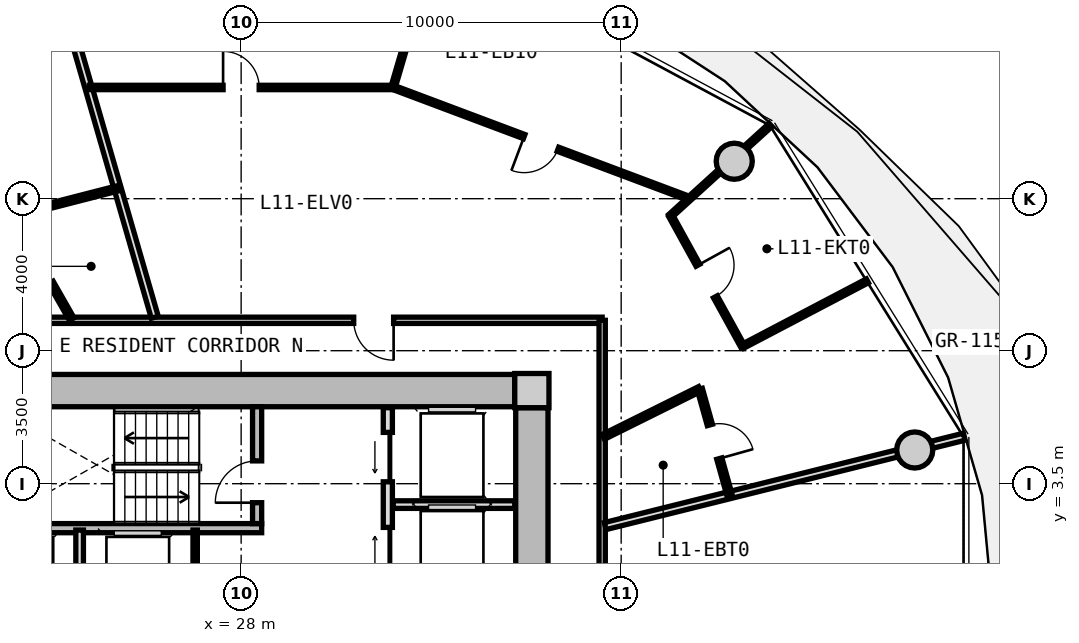
"""IFC4 building model, lengths in metres.
Left out: names, types, materials, properties, quantities, classifications, styles, units other than length and angle.
Written with IfcOpenShell. Run it as: python <this file> out.ifc"""

import sys

from ifc_helpers import new_model, si_unit, direction, frame, frame_2d, origin, origin_2d, place, context, subcontext, project, spatial, rectangle, circle, extrude, source, transform, mapped, element, fill, save


model = new_model("IFC4")
c1 = context("Model", 3, precision=1e-05, world=origin(), true_north=direction((0.0, 1.0)))
c2 = subcontext(c1, "Body", "Model", "MODEL_VIEW")
j1 = project(units=[si_unit("LENGTHUNIT", "METRE"), si_unit("PLANEANGLEUNIT", "RADIAN")], contexts=[c1])
p1 = place(None, origin())
s1 = spatial("IfcSite", under=j1, at=p1, CompositionType="ELEMENT")
p2 = place(p1, origin())
s2 = spatial("IfcBuilding", under=s1, at=p2, CompositionType="ELEMENT")
p3 = place(p2, frame((0.0, 0.0, 39.9)))
s3 = spatial("IfcBuildingStorey", under=s2, at=p3, CompositionType="ELEMENT", Elevation=39.9)
m1 = source(origin(), c2, "Body", "SweptSolid", [
    extrude(rectangle(XDim=0.9, YDim=0.9, at=origin_2d()), origin(), (0.0, 0.0, 1.0), 3.05),
])
p4 = place(p3, frame((35.65, 5.95, 0.0), z_axis=(0.0, 0.0, 1.0), x_axis=(1.0, 0.0, 0.0)))
e1 = element("IfcColumn", 1, at=p4, inside=s3, PredefinedType="COLUMN", context=c2, shape_type="MappedRepresentation", body=[
    mapped(m1, transform((0.0, 0.0, 0.0), x_axis=(1.0, 0.0, 0.0), y_axis=(0.0, 1.0, 0.0), z_axis=(0.0, 0.0, 1.0), scale=1.0)),
])
m2 = source(origin(), c2, "Body", "SweptSolid", [
    extrude(rectangle(XDim=14.4, YDim=0.85, at=frame_2d((7.2, 0.0))), origin(), (0.0, 0.0, 1.0), 2.79),
])
p5 = place(p3, frame((20.8, 5.95, 0.0), z_axis=(0.0, 0.0, 1.0), x_axis=(1.0, 0.0, 0.0)))
e2 = element("IfcWall", 2, at=p5, inside=s3, PredefinedType="SHEAR", context=c2, shape_type="MappedRepresentation", body=[
    mapped(m2, transform((0.0, 0.0, 0.0), x_axis=(1.0, 0.0, 0.0), y_axis=(0.0, 1.0, 0.0), z_axis=(0.0, 0.0, 1.0), scale=1.0)),
])
m3 = source(origin(), c2, "Body", "SweptSolid", [
    extrude(rectangle(XDim=11.0, YDim=0.85, at=frame_2d((5.5, 0.0))), origin(), (0.0, 0.0, 1.0), 2.79),
])
p6 = place(p3, frame((35.65, 5.5, 0.0), z_axis=(0.0, 0.0, 1.0), x_axis=(0.0, -1.0, 0.0)))
e3 = element("IfcWall", 3, at=p6, inside=s3, PredefinedType="SHEAR", context=c2, shape_type="MappedRepresentation", body=[
    mapped(m3, transform((0.0, 0.0, 0.0), x_axis=(1.0, 0.0, 0.0), y_axis=(0.0, 1.0, 0.0), z_axis=(0.0, 0.0, 1.0), scale=1.0)),
])
p7 = place(p6, frame((5.65, 0.0, 0.0)))
e4 = element("IfcOpeningElement", 4, at=p7, cuts=e3, PredefinedType="OPENING", context=c2, shape_type="SweptSolid", body=[
    extrude(rectangle(XDim=1.2, YDim=2.15, at=frame_2d((0.6, 1.075))), frame((0.0, 0.435, 0.0), z_axis=(0.0, -1.0, 0.0), x_axis=(1.0, 0.0, 0.0)), (0.0, 0.0, 1.0), 0.87),
])
p8 = place(p6, frame((9.3, 0.0, 0.0)))
e5 = element("IfcOpeningElement", 5, at=p8, cuts=e3, PredefinedType="OPENING", context=c2, shape_type="SweptSolid", body=[
    extrude(rectangle(XDim=1.0, YDim=2.1, at=frame_2d((0.5, 1.05))), frame((0.0, 0.435, 0.0), z_axis=(0.0, -1.0, 0.0), x_axis=(1.0, 0.0, 0.0)), (0.0, 0.0, 1.0), 0.87),
])
m4 = source(origin(), c2, "Body", "SweptSolid", [
    extrude(circle(Radius=0.475, at=origin_2d()), origin(), (0.0, 0.0, 1.0), 3.05),
])
for number, where, z_axis, x_axis in (
    (6, (45.725, 4.387, 0.0), (0.0, 0.0, 1.0), (1.0, 0.0, 0.0)),
    (7, (40.975, 11.985, 0.0), (0.0, 0.0, 1.0), (1.0, 0.0, 0.0)),
):
    element("IfcColumn", number, at=place(p3, frame(where, z_axis=z_axis, x_axis=x_axis)), inside=s3, PredefinedType="COLUMN", context=c2, shape_type="MappedRepresentation", body=[
        mapped(m4, transform((0.0, 0.0, 0.0), x_axis=(1.0, 0.0, 0.0), y_axis=(0.0, 1.0, 0.0), z_axis=(0.0, 0.0, 1.0), scale=1.0)),
    ])
m5 = source(origin(), c2, "Body", "SweptSolid", [
    extrude(rectangle(XDim=7.765, YDim=0.24, at=frame_2d((3.883, 0.0))), origin(), (0.0, 0.0, 1.0), 2.79),
])
p9 = place(p3, frame((20.775, 2.33, 0.0), z_axis=(0.0, 0.0, 1.0), x_axis=(1.0, 0.0, 0.0)))
e8 = element("IfcWall", 8, at=p9, inside=s3, PredefinedType="PARTITIONING", context=c2, shape_type="MappedRepresentation", body=[
    mapped(m5, transform((0.0, 0.0, 0.0), x_axis=(1.0, 0.0, 0.0), y_axis=(0.0, 1.0, 0.0), z_axis=(0.0, 0.0, 1.0), scale=1.0)),
])
m6 = source(origin(), c2, "Body", "SweptSolid", [
    extrude(rectangle(XDim=3.075, YDim=0.24, at=frame_2d((1.538, 0.0))), origin(), (0.0, 0.0, 1.0), 2.79),
])
p10 = place(p3, frame((28.42, 2.45, 0.0), z_axis=(0.0, 0.0, 1.0), x_axis=(0.0, 1.0, 0.0)))
e9 = element("IfcWall", 9, at=p10, inside=s3, PredefinedType="PARTITIONING", context=c2, shape_type="MappedRepresentation", body=[
    mapped(m6, transform((0.0, 0.0, 0.0), x_axis=(1.0, 0.0, 0.0), y_axis=(0.0, 1.0, 0.0), z_axis=(0.0, 0.0, 1.0), scale=1.0)),
])
p11 = place(p10, frame((0.55, 0.0, 0.0)))
e10 = element("IfcOpeningElement", 10, at=p11, cuts=e9, PredefinedType="OPENING", context=c2, shape_type="SweptSolid", body=[
    extrude(rectangle(XDim=1.1, YDim=2.15, at=frame_2d((0.55, 1.075))), frame((0.0, 0.13, 0.0), z_axis=(0.0, -1.0, 0.0), x_axis=(1.0, 0.0, 0.0)), (0.0, 0.0, 1.0), 0.26),
])
m7 = source(origin(), c2, "Body", "SweptSolid", [
    extrude(rectangle(XDim=5.0, YDim=0.24, at=frame_2d((2.5, 0.0))), origin(), (0.0, 0.0, 1.0), 2.775),
])
p12 = place(p3, frame((31.86, 0.5, 0.0), z_axis=(0.0, 0.0, 1.0), x_axis=(0.0, 1.0, 0.0)))
e11 = element("IfcWall", 11, at=p12, inside=s3, PredefinedType="PARTITIONING", context=c2, shape_type="MappedRepresentation", body=[
    mapped(m7, transform((0.0, 0.0, 0.0), x_axis=(1.0, 0.0, 0.0), y_axis=(0.0, 1.0, 0.0), z_axis=(0.0, 0.0, 1.0), scale=1.0)),
])
p13 = place(p12, frame((3.05, 0.0, 0.0)))
e12 = element("IfcOpeningElement", 12, at=p13, cuts=e11, PredefinedType="OPENING", context=c2, shape_type="SweptSolid", body=[
    extrude(rectangle(XDim=1.3, YDim=2.2, at=frame_2d((0.65, 1.1))), frame((0.0, 0.13, 0.0), z_axis=(0.0, -1.0, 0.0), x_axis=(1.0, 0.0, 0.0)), (0.0, 0.0, 1.0), 0.26),
])
p14 = place(p12, frame((0.55, 0.0, 0.0)))
e13 = element("IfcOpeningElement", 13, at=p14, cuts=e11, PredefinedType="OPENING", context=c2, shape_type="SweptSolid", body=[
    extrude(rectangle(XDim=1.3, YDim=2.2, at=frame_2d((0.65, 1.1))), frame((0.0, 0.13, 0.0), z_axis=(0.0, -1.0, 0.0), x_axis=(1.0, 0.0, 0.0)), (0.0, 0.0, 1.0), 0.26),
])
m8 = source(origin(), c2, "Body", "SweptSolid", [
    extrude(rectangle(XDim=3.2, YDim=0.2, at=frame_2d((1.6, 0.0))), origin(), (0.0, 0.0, 1.0), 2.775),
])
p15 = place(p3, frame((32.0, 2.95, 0.0), z_axis=(0.0, 0.0, 1.0), x_axis=(1.0, 0.0, 0.0)))
e14 = element("IfcWall", 14, at=p15, inside=s3, PredefinedType="PARTITIONING", context=c2, shape_type="MappedRepresentation", body=[
    mapped(m8, transform((0.0, 0.0, 0.0), x_axis=(1.0, 0.0, 0.0), y_axis=(0.0, 1.0, 0.0), z_axis=(0.0, 0.0, 1.0), scale=1.0)),
])
m9 = source(origin(), c2, "Body", "SweptSolid", [
    extrude(rectangle(XDim=2.33, YDim=0.115, at=frame_2d((1.165, 0.0))), origin(), (0.0, 0.0, 1.0), 2.775),
])
p16 = place(p3, frame((26.79, -0.05, 0.0), z_axis=(0.0, 0.0, 1.0), x_axis=(0.0, 1.0, 0.0)))
e15 = element("IfcWall", 15, at=p16, inside=s3, PredefinedType="PARTITIONING", context=c2, shape_type="MappedRepresentation", body=[
    mapped(m9, transform((0.0, 0.0, 0.0), x_axis=(1.0, 0.0, 0.0), y_axis=(0.0, 1.0, 0.0), z_axis=(0.0, 0.0, 1.0), scale=1.0)),
])
m10 = source(origin(), c2, "Body", "SweptSolid", [
    extrude(rectangle(XDim=2.33, YDim=0.2, at=frame_2d((1.165, 0.0))), origin(), (0.0, 0.0, 1.0), 2.775),
])
p17 = place(p3, frame((23.75, -0.05, 0.0), z_axis=(0.0, 0.0, 1.0), x_axis=(0.0, 1.0, 0.0)))
e16 = element("IfcWall", 16, at=p17, inside=s3, PredefinedType="PARTITIONING", context=c2, shape_type="MappedRepresentation", body=[
    mapped(m10, transform((0.0, 0.0, 0.0), x_axis=(1.0, 0.0, 0.0), y_axis=(0.0, 1.0, 0.0), z_axis=(0.0, 0.0, 1.0), scale=1.0)),
])
m11 = source(origin(), c2, "Body", "SweptSolid", [
    extrude(rectangle(XDim=19.0, YDim=0.165, at=frame_2d((9.5, 0.0))), origin(), (0.0, 0.0, 1.0), 2.775),
])
p18 = place(p3, frame((18.5, 7.8, 0.0), z_axis=(0.0, 0.0, 1.0), x_axis=(1.0, 0.0, 0.0)))
e17 = element("IfcWall", 17, at=p18, inside=s3, PredefinedType="PARTITIONING", context=c2, shape_type="MappedRepresentation", body=[
    mapped(m11, transform((0.0, 0.0, 0.0), x_axis=(1.0, 0.0, 0.0), y_axis=(0.0, 1.0, 0.0), z_axis=(0.0, 0.0, 1.0), scale=1.0)),
])
p19 = place(p18, frame((12.462, 0.0, 0.0)))
e18 = element("IfcOpeningElement", 18, at=p19, cuts=e17, PredefinedType="OPENING", context=c2, shape_type="SweptSolid", body=[
    extrude(rectangle(XDim=1.05, YDim=2.15, at=frame_2d((0.525, 1.075))), frame((0.0, 0.093, 0.0), z_axis=(0.0, -1.0, 0.0), x_axis=(1.0, 0.0, 0.0)), (0.0, 0.0, 1.0), 0.185),
])
m12 = source(origin(), c2, "Body", "SweptSolid", [
    extrude(rectangle(XDim=15.6, YDim=0.165, at=frame_2d((7.8, 0.0))), origin(), (0.0, 0.0, 1.0), 2.775),
])
p20 = place(p3, frame((37.5, 7.8, 0.0), z_axis=(0.0, 0.0, 1.0), x_axis=(0.0, -1.0, 0.0)))
e19 = element("IfcWall", 19, at=p20, inside=s3, PredefinedType="PARTITIONING", context=c2, shape_type="MappedRepresentation", body=[
    mapped(m12, transform((0.0, 0.0, 0.0), x_axis=(1.0, 0.0, 0.0), y_axis=(0.0, 1.0, 0.0), z_axis=(0.0, 0.0, 1.0), scale=1.0)),
])
p21 = place(p20, frame((14.215, 0.0, 0.0)))
e20 = element("IfcOpeningElement", 20, at=p21, cuts=e19, PredefinedType="OPENING", context=c2, shape_type="SweptSolid", body=[
    extrude(rectangle(XDim=0.92, YDim=2.1, at=frame_2d((0.46, 1.05))), frame((0.0, 0.093, 0.0), z_axis=(0.0, -1.0, 0.0), x_axis=(1.0, 0.0, 0.0)), (0.0, 0.0, 1.0), 0.185),
])
p22 = place(p20, frame((11.609, 0.0, 0.0)))
e21 = element("IfcOpeningElement", 21, at=p22, cuts=e19, PredefinedType="OPENING", context=c2, shape_type="SweptSolid", body=[
    extrude(rectangle(XDim=0.92, YDim=2.1, at=frame_2d((0.46, 1.05))), frame((0.0, 0.093, 0.0), z_axis=(0.0, -1.0, 0.0), x_axis=(1.0, 0.0, 0.0)), (0.0, 0.0, 1.0), 0.185),
])
p23 = place(p20, frame((7.175, 0.0, 0.0)))
e22 = element("IfcOpeningElement", 22, at=p23, cuts=e19, PredefinedType="OPENING", context=c2, shape_type="SweptSolid", body=[
    extrude(rectangle(XDim=1.25, YDim=2.2, at=frame_2d((0.625, 1.1))), frame((0.0, 0.093, 0.0), z_axis=(0.0, -1.0, 0.0), x_axis=(1.0, 0.0, 0.0)), (0.0, 0.0, 1.0), 0.185),
])
m13 = source(origin(), c2, "Body", "SweptSolid", [
    extrude(rectangle(XDim=10.196, YDim=0.19, at=frame_2d((5.098, 0.0))), origin(), (0.0, 0.0, 1.0), 2.225),
])
p24 = place(p3, frame((25.727, 7.88, 0.0), z_axis=(0.0, 0.0, 1.0), x_axis=(-0.277136420347, 0.960830580549, 0.0)))
e23 = element("IfcWall", 23, at=p24, inside=s3, PredefinedType="PARTITIONING", context=c2, shape_type="MappedRepresentation", body=[
    mapped(m13, transform((0.0, 0.0, 0.0), x_axis=(1.0, 0.0, 0.0), y_axis=(0.0, 1.0, 0.0), z_axis=(0.0, 0.0, 1.0), scale=1.0)),
])
m14 = source(origin(), c2, "Body", "SweptSolid", [
    extrude(rectangle(XDim=3.141, YDim=0.14, at=frame_2d((1.571, 0.0))), origin(), (0.0, 0.0, 1.0), 2.775),
])
p25 = place(p3, frame((23.542, 7.83, 0.0), z_axis=(0.0, 0.0, 1.0), x_axis=(-0.494874486088, 0.868964465913, 0.0)))
e24 = element("IfcWall", 24, at=p25, inside=s3, PredefinedType="PARTITIONING", context=c2, shape_type="MappedRepresentation", body=[
    mapped(m14, transform((0.0, 0.0, 0.0), x_axis=(1.0, 0.0, 0.0), y_axis=(0.0, 1.0, 0.0), z_axis=(0.0, 0.0, 1.0), scale=1.0)),
])
p26 = place(p25, frame((1.111, 0.0, 0.0)))
e25 = element("IfcOpeningElement", 25, at=p26, cuts=e24, PredefinedType="OPENING", context=c2, shape_type="SweptSolid", body=[
    extrude(rectangle(XDim=0.92, YDim=2.1, at=frame_2d((0.46, 1.05))), frame((0.0, 0.08, 0.0), z_axis=(0.0, -1.0, 0.0), x_axis=(1.0, 0.0, 0.0)), (0.0, 0.0, 1.0), 0.16),
])
m15 = source(origin(), c2, "Body", "SweptSolid", [
    extrude(rectangle(XDim=2.868, YDim=0.14, at=frame_2d((1.434, 0.0))), origin(), (0.0, 0.0, 1.0), 2.775),
])
p27 = place(p3, frame((21.987, 10.56, 0.0), z_axis=(0.0, 0.0, 1.0), x_axis=(0.968467705195, 0.249139125778, 0.0)))
e26 = element("IfcWall", 26, at=p27, inside=s3, PredefinedType="PARTITIONING", context=c2, shape_type="MappedRepresentation", body=[
    mapped(m15, transform((0.0, 0.0, 0.0), x_axis=(1.0, 0.0, 0.0), y_axis=(0.0, 1.0, 0.0), z_axis=(0.0, 0.0, 1.0), scale=1.0)),
])
m16 = source(origin(), c2, "Body", "SweptSolid", [
    extrude(rectangle(XDim=9.737, YDim=0.19, at=frame_2d((4.869, 0.0))), origin(), (0.0, 0.0, 1.0), 2.225),
])
p28 = place(p3, frame((37.58, 2.385, 0.0), z_axis=(0.0, 0.0, 1.0), x_axis=(0.970392716238, 0.241532557375, 0.0)))
e27 = element("IfcWall", 27, at=p28, inside=s3, PredefinedType="PARTITIONING", context=c2, shape_type="MappedRepresentation", body=[
    mapped(m16, transform((0.0, 0.0, 0.0), x_axis=(1.0, 0.0, 0.0), y_axis=(0.0, 1.0, 0.0), z_axis=(0.0, 0.0, 1.0), scale=1.0)),
])
m17 = source(origin(), c2, "Body", "SweptSolid", [
    extrude(rectangle(XDim=8.32, YDim=0.115, at=frame_2d((4.16, 0.0))), origin(), (0.0, 0.0, 1.0), 2.775),
])
p29 = place(p3, frame((39.786, 11.006, 0.0), z_axis=(0.0, 0.0, 1.0), x_axis=(-0.936180763098, 0.351518959382, 0.0)))
e28 = element("IfcWall", 28, at=p29, inside=s3, PredefinedType="PARTITIONING", context=c2, shape_type="MappedRepresentation", body=[
    mapped(m17, transform((0.0, 0.0, 0.0), x_axis=(1.0, 0.0, 0.0), y_axis=(0.0, 1.0, 0.0), z_axis=(0.0, 0.0, 1.0), scale=1.0)),
])
p30 = place(p29, frame((3.685, 0.0, 0.0)))
e29 = element("IfcOpeningElement", 29, at=p30, cuts=e28, PredefinedType="OPENING", context=c2, shape_type="SweptSolid", body=[
    extrude(rectangle(XDim=0.95, YDim=2.1, at=frame_2d((0.475, 1.05))), frame((0.0, 0.067, 0.0), z_axis=(0.0, -1.0, 0.0), x_axis=(1.0, 0.0, 0.0)), (0.0, 0.0, 1.0), 0.135),
])
m18 = source(origin(), c2, "Body", "SweptSolid", [
    extrude(rectangle(XDim=3.563, YDim=0.115, at=frame_2d((1.781, 0.0))), origin(), (0.0, 0.0, 1.0), 2.225),
])
p31 = place(p3, frame((39.292, 10.545, 0.0), z_axis=(0.0, 0.0, 1.0), x_axis=(0.740277955068, 0.672300936515, 0.0)))
e30 = element("IfcWall", 30, at=p31, inside=s3, PredefinedType="PARTITIONING", context=c2, shape_type="MappedRepresentation", body=[
    mapped(m18, transform((0.0, 0.0, 0.0), x_axis=(1.0, 0.0, 0.0), y_axis=(0.0, 1.0, 0.0), z_axis=(0.0, 0.0, 1.0), scale=1.0)),
])
m19 = source(origin(), c2, "Body", "SweptSolid", [
    extrude(rectangle(XDim=7.993, YDim=0.115, at=frame_2d((3.996, 0.0))), origin(), (0.0, 0.0, 1.0), 2.775),
])
p32 = place(p3, frame((31.996, 13.927, 0.0), z_axis=(0.0, 0.0, 1.0), x_axis=(-1.0, 0.0, 0.0)))
e31 = element("IfcWall", 31, at=p32, inside=s3, PredefinedType="PARTITIONING", context=c2, shape_type="MappedRepresentation", body=[
    mapped(m19, transform((0.0, 0.0, 0.0), x_axis=(1.0, 0.0, 0.0), y_axis=(0.0, 1.0, 0.0), z_axis=(0.0, 0.0, 1.0), scale=1.0)),
])
p33 = place(p32, frame((3.521, 0.0, 0.0)))
e32 = element("IfcOpeningElement", 32, at=p33, cuts=e31, PredefinedType="OPENING", context=c2, shape_type="SweptSolid", body=[
    extrude(rectangle(XDim=0.95, YDim=2.1, at=frame_2d((0.475, 1.05))), frame((0.0, 0.067, 0.0), z_axis=(0.0, -1.0, 0.0), x_axis=(1.0, 0.0, 0.0)), (0.0, 0.0, 1.0), 0.135),
])
m20 = source(origin(), c2, "Body", "SweptSolid", [
    extrude(rectangle(XDim=3.908, YDim=0.115, at=frame_2d((1.954, 0.0))), origin(), (0.0, 0.0, 1.0), 2.225),
])
p34 = place(p3, frame((31.996, 13.927, 0.0), z_axis=(0.0, 0.0, 1.0), x_axis=(0.282047948883, 0.959400309845, 0.0)))
e33 = element("IfcWall", 33, at=p34, inside=s3, PredefinedType="PARTITIONING", context=c2, shape_type="MappedRepresentation", body=[
    mapped(m20, transform((0.0, 0.0, 0.0), x_axis=(1.0, 0.0, 0.0), y_axis=(0.0, 1.0, 0.0), z_axis=(0.0, 0.0, 1.0), scale=1.0)),
])
m21 = source(origin(), c2, "Body", "SweptSolid", [
    extrude(rectangle(XDim=2.834, YDim=0.14, at=frame_2d((1.417, 0.0))), origin(), (0.0, 0.0, 1.0), 2.775),
])
p35 = place(p3, frame((37.53, 4.732, 0.0), z_axis=(0.0, 0.0, 1.0), x_axis=(0.895681174462, 0.444696788513, 0.0)))
e34 = element("IfcWall", 34, at=p35, inside=s3, PredefinedType="PARTITIONING", context=c2, shape_type="MappedRepresentation", body=[
    mapped(m21, transform((0.0, 0.0, 0.0), x_axis=(1.0, 0.0, 0.0), y_axis=(0.0, 1.0, 0.0), z_axis=(0.0, 0.0, 1.0), scale=1.0)),
])
m22 = source(origin(), c2, "Body", "SweptSolid", [
    extrude(rectangle(XDim=2.885, YDim=0.14, at=frame_2d((1.442, 0.0))), origin(), (0.0, 0.0, 1.0), 2.775),
])
p36 = place(p3, frame((40.069, 5.992, 0.0), z_axis=(0.0, 0.0, 1.0), x_axis=(0.269799431837, -0.962916541856, 0.0)))
e35 = element("IfcWall", 35, at=p36, inside=s3, PredefinedType="PARTITIONING", context=c2, shape_type="MappedRepresentation", body=[
    mapped(m22, transform((0.0, 0.0, 0.0), x_axis=(1.0, 0.0, 0.0), y_axis=(0.0, 1.0, 0.0), z_axis=(0.0, 0.0, 1.0), scale=1.0)),
])
p37 = place(p36, frame((0.982, 0.0, 0.0)))
e36 = element("IfcOpeningElement", 36, at=p37, cuts=e35, PredefinedType="OPENING", context=c2, shape_type="SweptSolid", body=[
    extrude(rectangle(XDim=0.92, YDim=2.1, at=frame_2d((0.46, 1.05))), frame((0.0, 0.08, 0.0), z_axis=(0.0, -1.0, 0.0), x_axis=(1.0, 0.0, 0.0)), (0.0, 0.0, 1.0), 0.16),
])
m23 = source(origin(), c2, "Body", "SweptSolid", [
    extrude(rectangle(XDim=3.706, YDim=0.115, at=frame_2d((1.853, 0.0))), origin(), (0.0, 0.0, 1.0), 2.775),
])
p38 = place(p3, frame((41.198, 7.115, 0.0), z_axis=(0.0, 0.0, 1.0), x_axis=(0.88538502503, 0.464858427322, 0.0)))
e37 = element("IfcWall", 37, at=p38, inside=s3, PredefinedType="PARTITIONING", context=c2, shape_type="MappedRepresentation", body=[
    mapped(m23, transform((0.0, 0.0, 0.0), x_axis=(1.0, 0.0, 0.0), y_axis=(0.0, 1.0, 0.0), z_axis=(0.0, 0.0, 1.0), scale=1.0)),
])
m24 = source(origin(), c2, "Body", "SweptSolid", [
    extrude(rectangle(XDim=3.926, YDim=0.115, at=frame_2d((1.963, 0.0))), origin(), (0.0, 0.0, 1.0), 2.775),
])
p39 = place(p3, frame((41.198, 7.115, 0.0), z_axis=(0.0, 0.0, 1.0), x_axis=(-0.483037889915, 0.875599450038, 0.0)))
e38 = element("IfcWall", 38, at=p39, inside=s3, PredefinedType="PARTITIONING", context=c2, shape_type="MappedRepresentation", body=[
    mapped(m24, transform((0.0, 0.0, 0.0), x_axis=(1.0, 0.0, 0.0), y_axis=(0.0, 1.0, 0.0), z_axis=(0.0, 0.0, 1.0), scale=1.0)),
])
p40 = place(p39, frame((1.488, 0.0, 0.0)))
e39 = element("IfcOpeningElement", 39, at=p40, cuts=e38, PredefinedType="OPENING", context=c2, shape_type="SweptSolid", body=[
    extrude(rectangle(XDim=0.95, YDim=2.1, at=frame_2d((0.475, 1.05))), frame((0.0, 0.067, 0.0), z_axis=(0.0, -1.0, 0.0), x_axis=(1.0, 0.0, 0.0)), (0.0, 0.0, 1.0), 0.135),
])
m25 = source(origin(), c2, "Body", "SweptSolid", [
    extrude(rectangle(XDim=1.1, YDim=2.15, at=frame_2d((0.55, 1.075))), frame((0.0, 0.025, 0.0), z_axis=(0.0, -1.0, 0.0), x_axis=(1.0, 0.0, 0.0)), (0.0, 0.0, 1.0), 0.05),
])
p41 = place(p11, origin())
e40 = element("IfcDoor", 40, at=p41, inside=s3, OperationType="SINGLE_SWING_LEFT", PredefinedType="DOOR", context=c2, shape_type="MappedRepresentation", body=[
    mapped(m25, transform((0.0, 0.0, 0.0), x_axis=(1.0, 0.0, 0.0), y_axis=(0.0, 1.0, 0.0), z_axis=(0.0, 0.0, 1.0), scale=1.0)),
])
fill(e10, e40)
m26 = source(origin(), c2, "Body", "SweptSolid", [
    extrude(rectangle(XDim=1.3, YDim=2.2, at=frame_2d((0.65, 1.1))), frame((0.0, 0.025, 0.0), z_axis=(0.0, -1.0, 0.0), x_axis=(1.0, 0.0, 0.0)), (0.0, 0.0, 1.0), 0.05),
])
p42 = place(p13, origin())
e41 = element("IfcDoor", 41, at=p42, inside=s3, OperationType="SLIDING_TO_LEFT", PredefinedType="DOOR", context=c2, shape_type="MappedRepresentation", body=[
    mapped(m26, transform((0.0, 0.0, 0.0), x_axis=(1.0, 0.0, 0.0), y_axis=(0.0, 1.0, 0.0), z_axis=(0.0, 0.0, 1.0), scale=1.0)),
])
fill(e12, e41)
p43 = place(p14, origin())
e42 = element("IfcDoor", 42, at=p43, inside=s3, OperationType="SLIDING_TO_RIGHT", PredefinedType="DOOR", context=c2, shape_type="MappedRepresentation", body=[
    mapped(m26, transform((0.0, 0.0, 0.0), x_axis=(1.0, 0.0, 0.0), y_axis=(0.0, 1.0, 0.0), z_axis=(0.0, 0.0, 1.0), scale=1.0)),
])
fill(e13, e42)
m27 = source(origin(), c2, "Body", "SweptSolid", [
    extrude(rectangle(XDim=1.05, YDim=2.15, at=frame_2d((0.525, 1.075))), frame((0.0, 0.025, 0.0), z_axis=(0.0, -1.0, 0.0), x_axis=(1.0, 0.0, 0.0)), (0.0, 0.0, 1.0), 0.05),
])
p44 = place(p19, frame((1.05, 0.0, 0.0), z_axis=(0.0, 0.0, 1.0), x_axis=(-1.0, 0.0, 0.0)))
e43 = element("IfcDoor", 43, at=p44, inside=s3, OperationType="SINGLE_SWING_LEFT", PredefinedType="DOOR", context=c2, shape_type="MappedRepresentation", body=[
    mapped(m27, transform((0.0, 0.0, 0.0), x_axis=(1.0, 0.0, 0.0), y_axis=(0.0, 1.0, 0.0), z_axis=(0.0, 0.0, 1.0), scale=1.0)),
])
fill(e18, e43)
m28 = source(origin(), c2, "Body", "SweptSolid", [
    extrude(rectangle(XDim=0.92, YDim=2.1, at=frame_2d((0.46, 1.05))), frame((0.0, 0.025, 0.0), z_axis=(0.0, -1.0, 0.0), x_axis=(1.0, 0.0, 0.0)), (0.0, 0.0, 1.0), 0.05),
])
p45 = place(p37, origin())
e44 = element("IfcDoor", 44, at=p45, inside=s3, OperationType="SINGLE_SWING_RIGHT", PredefinedType="DOOR", context=c2, shape_type="MappedRepresentation", body=[
    mapped(m28, transform((0.0, 0.0, 0.0), x_axis=(1.0, 0.0, 0.0), y_axis=(0.0, 1.0, 0.0), z_axis=(0.0, 0.0, 1.0), scale=1.0)),
])
fill(e36, e44)
m29 = source(origin(), c2, "Body", "SweptSolid", [
    extrude(rectangle(XDim=0.95, YDim=2.1, at=frame_2d((0.475, 1.05))), frame((0.0, 0.025, 0.0), z_axis=(0.0, -1.0, 0.0), x_axis=(1.0, 0.0, 0.0)), (0.0, 0.0, 1.0), 0.05),
])
p46 = place(p40, frame((0.95, 0.0, 0.0), z_axis=(0.0, 0.0, 1.0), x_axis=(-1.0, 0.0, 0.0)))
e45 = element("IfcDoor", 45, at=p46, inside=s3, OperationType="SINGLE_SWING_LEFT", PredefinedType="DOOR", context=c2, shape_type="MappedRepresentation", body=[
    mapped(m29, transform((0.0, 0.0, 0.0), x_axis=(1.0, 0.0, 0.0), y_axis=(0.0, 1.0, 0.0), z_axis=(0.0, 0.0, 1.0), scale=1.0)),
])
fill(e39, e45)
p47 = place(p30, origin())
e46 = element("IfcDoor", 46, at=p47, inside=s3, OperationType="SINGLE_SWING_RIGHT", PredefinedType="DOOR", context=c2, shape_type="MappedRepresentation", body=[
    mapped(m29, transform((0.0, 0.0, 0.0), x_axis=(1.0, 0.0, 0.0), y_axis=(0.0, 1.0, 0.0), z_axis=(0.0, 0.0, 1.0), scale=1.0)),
])
fill(e29, e46)
p48 = place(p33, frame((0.95, 0.0, 0.0), z_axis=(0.0, 0.0, 1.0), x_axis=(-1.0, 0.0, 0.0)))
e47 = element("IfcDoor", 47, at=p48, inside=s3, OperationType="SINGLE_SWING_LEFT", PredefinedType="DOOR", context=c2, shape_type="MappedRepresentation", body=[
    mapped(m29, transform((0.0, 0.0, 0.0), x_axis=(1.0, 0.0, 0.0), y_axis=(0.0, 1.0, 0.0), z_axis=(0.0, 0.0, 1.0), scale=1.0)),
])
fill(e32, e47)
save(model, sys.argv[1])
